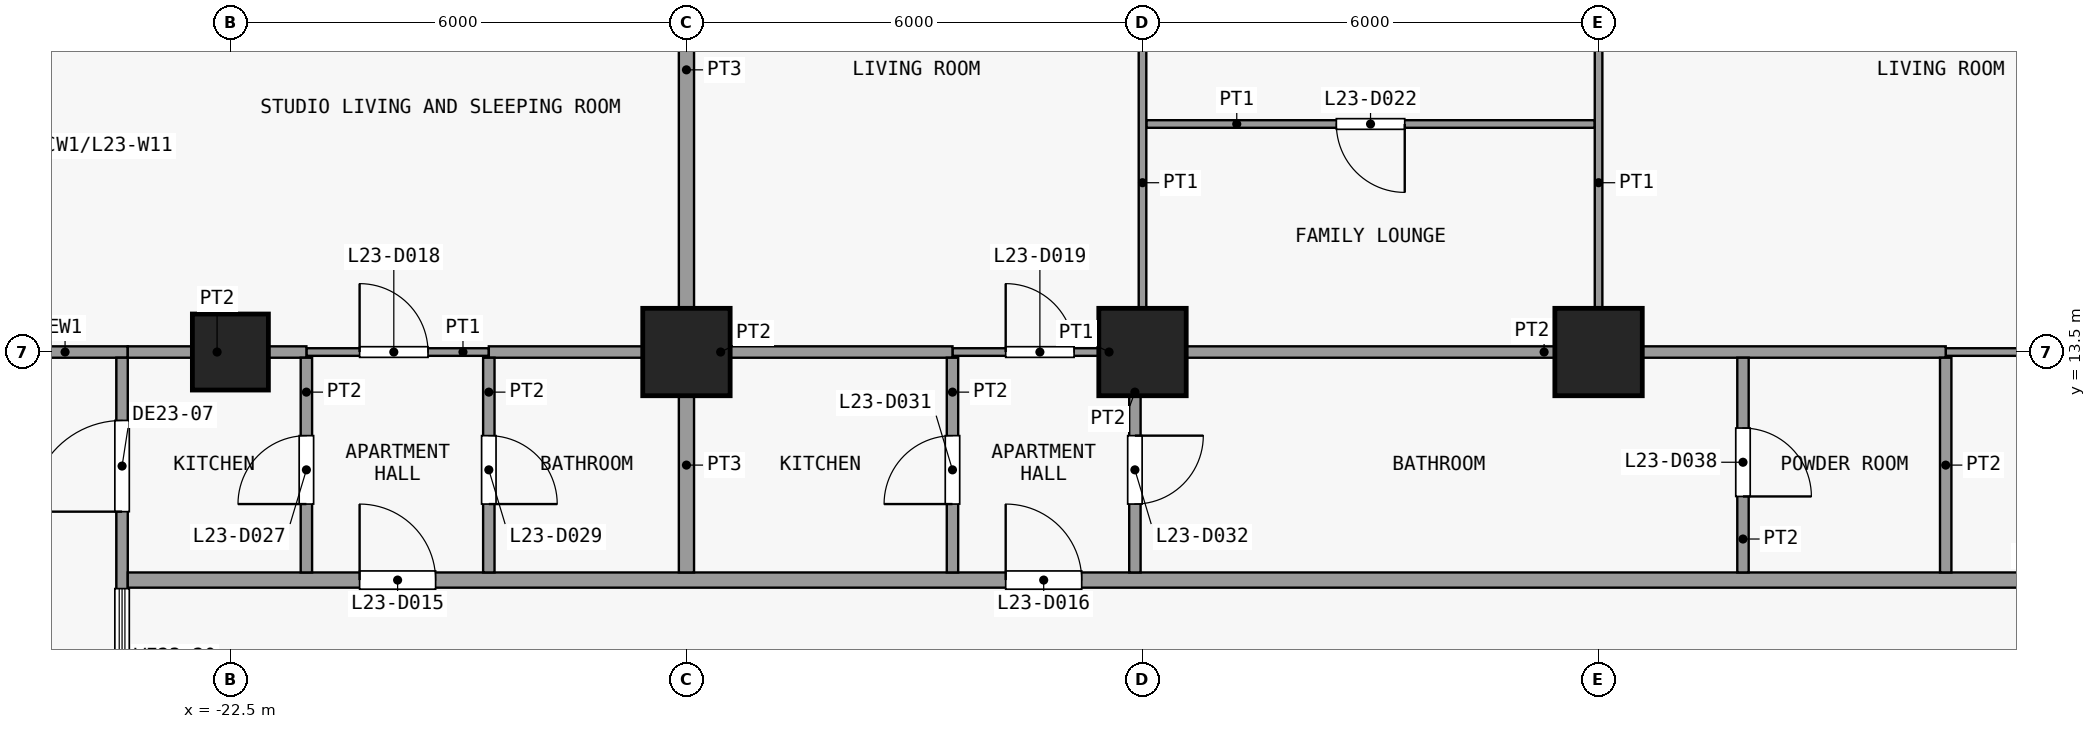
"""IFC4 building model, lengths in metres.
Left out: names, types, materials, properties, quantities, classifications, styles, units other than length and angle.
Written with IfcOpenShell. Run it as: python <this file> out.ifc"""

import sys

from ifc_helpers import new_model, si_unit, direction, frame, frame_2d, origin, origin_2d, place, context, subcontext, project, spatial, rectangle, extrude, element, fill, save


model = new_model("IFC4")
c1 = context("Model", 3, precision=1e-05, world=origin(), true_north=direction((0.0, 1.0)))
c2 = subcontext(c1, "Body", "Model", "MODEL_VIEW")
j1 = project(units=[si_unit("LENGTHUNIT", "METRE"), si_unit("PLANEANGLEUNIT", "RADIAN")], contexts=[c1])
p1 = place(None, origin())
s1 = spatial("IfcSite", under=j1, at=p1, CompositionType="ELEMENT")
p2 = place(p1, origin())
s2 = spatial("IfcBuilding", under=s1, at=p2, CompositionType="ELEMENT")
p3 = place(p2, frame((0.0, 0.0, 95.5)))
s3 = spatial("IfcBuildingStorey", under=s2, at=p3, CompositionType="ELEMENT", Elevation=95.5)
p4 = place(p3, frame((-22.5, 13.5, 0.0), z_axis=(0.0, 0.0, 1.0), x_axis=(1.0, 0.0, 0.0)))
e1 = element("IfcColumn", 1, at=p4, inside=s3, PredefinedType="COLUMN", context=c2, shape_type="SweptSolid", body=[
    extrude(rectangle(XDim=1.0, YDim=1.0, at=origin_2d()), origin(), (0.0, 0.0, 1.0), 3.6),
])
for number, where, z_axis, x_axis in (
    (2, (-16.5, 13.5, 0.0), (0.0, 0.0, 1.0), (1.0, 0.0, 0.0)),
    (3, (-10.5, 13.5, 0.0), (0.0, 0.0, 1.0), (1.0, 0.0, 0.0)),
    (4, (-4.5, 13.5, 0.0), (0.0, 0.0, 1.0), (1.0, 0.0, 0.0)),
):
    element("IfcColumn", number, at=place(p3, frame(where, z_axis=z_axis, x_axis=x_axis)), inside=s3, PredefinedType="COLUMN", context=c2, shape_type="SweptSolid", body=[
        extrude(rectangle(XDim=1.15, YDim=1.15, at=origin_2d()), origin(), (0.0, 0.0, 1.0), 3.6),
    ])
p5 = place(p3, frame((-23.85, 13.5, 0.0), z_axis=(0.0, 0.0, 1.0), x_axis=(-1.0, 0.0, 0.0)))
e5 = element("IfcWall", 5, at=p5, inside=s3, PredefinedType="SOLIDWALL", context=c2, shape_type="SweptSolid", body=[
    extrude(rectangle(XDim=1.65, YDim=0.15, at=frame_2d((0.825, 0.0))), origin(), (0.0, 0.0, 1.0), 3.3),
])
p6 = place(p3, frame((-23.925, 7.575, 0.0), z_axis=(0.0, 0.0, 1.0), x_axis=(0.0, 1.0, 0.0)))
e6 = element("IfcWall", 6, at=p6, inside=s3, PredefinedType="SOLIDWALL", context=c2, shape_type="SweptSolid", body=[
    extrude(rectangle(XDim=5.85, YDim=0.15, at=frame_2d((2.925, 0.0))), origin(), (0.0, 0.0, 1.0), 3.3),
])
p7 = place(p6, frame((3.825, 0.0, 0.0)))
e7 = element("IfcOpeningElement", 7, at=p7, cuts=e6, PredefinedType="OPENING", context=c2, shape_type="SweptSolid", body=[
    extrude(rectangle(XDim=1.2, YDim=2.4, at=frame_2d((0.6, 1.2))), frame((0.0, 0.085, 0.0), z_axis=(0.0, -1.0, 0.0), x_axis=(1.0, 0.0, 0.0)), (0.0, 0.0, 1.0), 0.17),
])
p8 = place(p6, frame((1.012, 0.0, 0.9)))
e8 = element("IfcOpeningElement", 8, at=p8, cuts=e6, PredefinedType="OPENING", context=c2, shape_type="SweptSolid", body=[
    extrude(rectangle(XDim=1.8, YDim=2.1, at=frame_2d((0.9, 1.05))), frame((0.0, 0.085, 0.0), z_axis=(0.0, -1.0, 0.0), x_axis=(1.0, 0.0, 0.0)), (0.0, 0.0, 1.0), 0.17),
])
p9 = place(p3, frame((-23.85, 10.5, 0.0), z_axis=(0.0, 0.0, 1.0), x_axis=(1.0, 0.0, 0.0)))
e9 = element("IfcWall", 9, at=p9, inside=s3, PredefinedType="PARTITIONING", context=c2, shape_type="SweptSolid", body=[
    extrude(rectangle(XDim=47.7, YDim=0.2, at=frame_2d((23.85, 0.0))), origin(), (0.0, 0.0, 1.0), 3.3),
])
p10 = place(p9, frame((3.05, 0.0, 0.0)))
e10 = element("IfcOpeningElement", 10, at=p10, cuts=e9, PredefinedType="OPENING", context=c2, shape_type="SweptSolid", body=[
    extrude(rectangle(XDim=1.0, YDim=2.1, at=frame_2d((0.5, 1.05))), frame((0.0, 0.11, 0.0), z_axis=(0.0, -1.0, 0.0), x_axis=(1.0, 0.0, 0.0)), (0.0, 0.0, 1.0), 0.22),
])
p11 = place(p9, frame((11.55, 0.0, 0.0)))
e11 = element("IfcOpeningElement", 11, at=p11, cuts=e9, PredefinedType="OPENING", context=c2, shape_type="SweptSolid", body=[
    extrude(rectangle(XDim=1.0, YDim=2.1, at=frame_2d((0.5, 1.05))), frame((0.0, 0.11, 0.0), z_axis=(0.0, -1.0, 0.0), x_axis=(1.0, 0.0, 0.0)), (0.0, 0.0, 1.0), 0.22),
])
p12 = place(p9, frame((37.55, 0.0, 0.0)))
e12 = element("IfcOpeningElement", 12, at=p12, cuts=e9, PredefinedType="OPENING", context=c2, shape_type="SweptSolid", body=[
    extrude(rectangle(XDim=1.0, YDim=2.1, at=frame_2d((0.5, 1.05))), frame((0.0, 0.11, 0.0), z_axis=(0.0, -1.0, 0.0), x_axis=(1.0, 0.0, 0.0)), (0.0, 0.0, 1.0), 0.22),
])
p13 = place(p3, frame((-21.5, 13.5, 0.0), z_axis=(0.0, 0.0, 1.0), x_axis=(1.0, 0.0, 0.0)))
e13 = element("IfcWall", 13, at=p13, inside=s3, PredefinedType="PARTITIONING", context=c2, shape_type="SweptSolid", body=[
    extrude(rectangle(XDim=2.4, YDim=0.1, at=frame_2d((1.2, 0.0))), origin(), (0.0, 0.0, 1.0), 3.3),
])
p14 = place(p13, frame((0.7, 0.0, 0.0)))
e14 = element("IfcOpeningElement", 14, at=p14, cuts=e13, PredefinedType="OPENING", context=c2, shape_type="SweptSolid", body=[
    extrude(rectangle(XDim=0.9, YDim=2.1, at=frame_2d((0.45, 1.05))), frame((0.0, 0.06, 0.0), z_axis=(0.0, -1.0, 0.0), x_axis=(1.0, 0.0, 0.0)), (0.0, 0.0, 1.0), 0.12),
])
p15 = place(p3, frame((-13.0, 13.5, 0.0), z_axis=(0.0, 0.0, 1.0), x_axis=(1.0, 0.0, 0.0)))
e15 = element("IfcWall", 15, at=p15, inside=s3, PredefinedType="PARTITIONING", context=c2, shape_type="SweptSolid", body=[
    extrude(rectangle(XDim=2.4, YDim=0.1, at=frame_2d((1.2, 0.0))), origin(), (0.0, 0.0, 1.0), 3.3),
])
p16 = place(p15, frame((0.7, 0.0, 0.0)))
e16 = element("IfcOpeningElement", 16, at=p16, cuts=e15, PredefinedType="OPENING", context=c2, shape_type="SweptSolid", body=[
    extrude(rectangle(XDim=0.9, YDim=2.1, at=frame_2d((0.45, 1.05))), frame((0.0, 0.06, 0.0), z_axis=(0.0, -1.0, 0.0), x_axis=(1.0, 0.0, 0.0)), (0.0, 0.0, 1.0), 0.12),
])
p17 = place(p3, frame((0.067, 13.5, 0.0), z_axis=(0.0, 0.0, 1.0), x_axis=(1.0, 0.0, 0.0)))
e17 = element("IfcWall", 17, at=p17, inside=s3, PredefinedType="PARTITIONING", context=c2, shape_type="SweptSolid", body=[
    extrude(rectangle(XDim=7.733, YDim=0.1, at=frame_2d((3.867, 0.0))), origin(), (0.0, 0.0, 1.0), 3.3),
])
p18 = place(p17, frame((1.8, 0.0, 0.0)))
e18 = element("IfcOpeningElement", 18, at=p18, cuts=e17, PredefinedType="OPENING", context=c2, shape_type="SweptSolid", body=[
    extrude(rectangle(XDim=0.9, YDim=2.1, at=frame_2d((0.45, 1.05))), frame((0.0, 0.06, 0.0), z_axis=(0.0, -1.0, 0.0), x_axis=(1.0, 0.0, 0.0)), (0.0, 0.0, 1.0), 0.12),
])
p19 = place(p3, frame((-23.85, 13.5, 0.0), z_axis=(0.0, 0.0, 1.0), x_axis=(1.0, 0.0, 0.0)))
e19 = element("IfcWall", 19, at=p19, inside=s3, PredefinedType="PARTITIONING", context=c2, shape_type="SweptSolid", body=[
    extrude(rectangle(XDim=2.35, YDim=0.15, at=frame_2d((1.175, 0.0))), origin(), (0.0, 0.0, 1.0), 3.3),
])
p20 = place(p3, frame((-19.1, 13.5, 0.0), z_axis=(0.0, 0.0, 1.0), x_axis=(1.0, 0.0, 0.0)))
e20 = element("IfcWall", 20, at=p20, inside=s3, PredefinedType="PARTITIONING", context=c2, shape_type="SweptSolid", body=[
    extrude(rectangle(XDim=6.1, YDim=0.15, at=frame_2d((3.05, 0.0))), origin(), (0.0, 0.0, 1.0), 3.3),
])
p21 = place(p3, frame((-10.5, 13.5, 0.0), z_axis=(0.0, 0.0, 1.0), x_axis=(1.0, 0.0, 0.0)))
e21 = element("IfcWall", 21, at=p21, inside=s3, PredefinedType="PARTITIONING", context=c2, shape_type="SweptSolid", body=[
    extrude(rectangle(XDim=10.567, YDim=0.15, at=frame_2d((5.283, 0.0))), origin(), (0.0, 0.0, 1.0), 3.3),
])
p22 = place(p3, frame((-10.45, 16.5, 0.0), z_axis=(0.0, 0.0, 1.0), x_axis=(1.0, 0.0, 0.0)))
e22 = element("IfcWall", 22, at=p22, inside=s3, PredefinedType="PARTITIONING", context=c2, shape_type="SweptSolid", body=[
    extrude(rectangle(XDim=5.9, YDim=0.1, at=frame_2d((2.95, 0.0))), origin(), (0.0, 0.0, 1.0), 3.3),
])
p23 = place(p22, frame((2.5, 0.0, 0.0)))
e23 = element("IfcOpeningElement", 23, at=p23, cuts=e22, PredefinedType="OPENING", context=c2, shape_type="SweptSolid", body=[
    extrude(rectangle(XDim=0.9, YDim=2.1, at=frame_2d((0.45, 1.05))), frame((0.0, 0.06, 0.0), z_axis=(0.0, -1.0, 0.0), x_axis=(1.0, 0.0, 0.0)), (0.0, 0.0, 1.0), 0.12),
])
p24 = place(p3, frame((-21.5, 10.6, 0.0), z_axis=(0.0, 0.0, 1.0), x_axis=(0.0, 1.0, 0.0)))
e24 = element("IfcWall", 24, at=p24, inside=s3, PredefinedType="PARTITIONING", context=c2, shape_type="SweptSolid", body=[
    extrude(rectangle(XDim=2.825, YDim=0.15, at=frame_2d((1.413, 0.0))), origin(), (0.0, 0.0, 1.0), 3.3),
])
p25 = place(p24, frame((0.9, 0.0, 0.0)))
e25 = element("IfcOpeningElement", 25, at=p25, cuts=e24, PredefinedType="OPENING", context=c2, shape_type="SweptSolid", body=[
    extrude(rectangle(XDim=0.9, YDim=2.1, at=frame_2d((0.45, 1.05))), frame((0.0, 0.085, 0.0), z_axis=(0.0, -1.0, 0.0), x_axis=(1.0, 0.0, 0.0)), (0.0, 0.0, 1.0), 0.17),
])
p26 = place(p3, frame((-19.1, 10.6, 0.0), z_axis=(0.0, 0.0, 1.0), x_axis=(0.0, 1.0, 0.0)))
e26 = element("IfcWall", 26, at=p26, inside=s3, PredefinedType="PARTITIONING", context=c2, shape_type="SweptSolid", body=[
    extrude(rectangle(XDim=2.825, YDim=0.15, at=frame_2d((1.413, 0.0))), origin(), (0.0, 0.0, 1.0), 3.3),
])
p27 = place(p26, frame((0.9, 0.0, 0.0)))
e27 = element("IfcOpeningElement", 27, at=p27, cuts=e26, PredefinedType="OPENING", context=c2, shape_type="SweptSolid", body=[
    extrude(rectangle(XDim=0.9, YDim=2.1, at=frame_2d((0.45, 1.05))), frame((0.0, 0.085, 0.0), z_axis=(0.0, -1.0, 0.0), x_axis=(1.0, 0.0, 0.0)), (0.0, 0.0, 1.0), 0.17),
])
p28 = place(p3, frame((-16.5, 10.6, 0.0), z_axis=(0.0, 0.0, 1.0), x_axis=(0.0, 1.0, 0.0)))
e28 = element("IfcWall", 28, at=p28, inside=s3, PredefinedType="PARTITIONING", context=c2, shape_type="SweptSolid", body=[
    extrude(rectangle(XDim=2.825, YDim=0.2, at=frame_2d((1.413, 0.0))), origin(), (0.0, 0.0, 1.0), 3.3),
])
p29 = place(p3, frame((-16.5, 13.575, 0.0), z_axis=(0.0, 0.0, 1.0), x_axis=(0.0, 1.0, 0.0)))
e29 = element("IfcWall", 29, at=p29, inside=s3, PredefinedType="PARTITIONING", context=c2, shape_type="SweptSolid", body=[
    extrude(rectangle(XDim=7.275, YDim=0.2, at=frame_2d((3.638, 0.0))), origin(), (0.0, 0.0, 1.0), 3.3),
])
p30 = place(p3, frame((-13.0, 10.6, 0.0), z_axis=(0.0, 0.0, 1.0), x_axis=(0.0, 1.0, 0.0)))
e30 = element("IfcWall", 30, at=p30, inside=s3, PredefinedType="PARTITIONING", context=c2, shape_type="SweptSolid", body=[
    extrude(rectangle(XDim=2.825, YDim=0.15, at=frame_2d((1.413, 0.0))), origin(), (0.0, 0.0, 1.0), 3.3),
])
p31 = place(p30, frame((0.9, 0.0, 0.0)))
e31 = element("IfcOpeningElement", 31, at=p31, cuts=e30, PredefinedType="OPENING", context=c2, shape_type="SweptSolid", body=[
    extrude(rectangle(XDim=0.9, YDim=2.1, at=frame_2d((0.45, 1.05))), frame((0.0, 0.085, 0.0), z_axis=(0.0, -1.0, 0.0), x_axis=(1.0, 0.0, 0.0)), (0.0, 0.0, 1.0), 0.17),
])
p32 = place(p3, frame((-10.6, 10.6, 0.0), z_axis=(0.0, 0.0, 1.0), x_axis=(0.0, 1.0, 0.0)))
e32 = element("IfcWall", 32, at=p32, inside=s3, PredefinedType="PARTITIONING", context=c2, shape_type="SweptSolid", body=[
    extrude(rectangle(XDim=2.825, YDim=0.15, at=frame_2d((1.413, 0.0))), origin(), (0.0, 0.0, 1.0), 3.3),
])
p33 = place(p32, frame((0.9, 0.0, 0.0)))
e33 = element("IfcOpeningElement", 33, at=p33, cuts=e32, PredefinedType="OPENING", context=c2, shape_type="SweptSolid", body=[
    extrude(rectangle(XDim=0.9, YDim=2.1, at=frame_2d((0.45, 1.05))), frame((0.0, 0.085, 0.0), z_axis=(0.0, -1.0, 0.0), x_axis=(1.0, 0.0, 0.0)), (0.0, 0.0, 1.0), 0.17),
])
p34 = place(p3, frame((-10.5, 13.575, 0.0), z_axis=(0.0, 0.0, 1.0), x_axis=(0.0, 1.0, 0.0)))
e34 = element("IfcWall", 34, at=p34, inside=s3, PredefinedType="PARTITIONING", context=c2, shape_type="SweptSolid", body=[
    extrude(rectangle(XDim=7.275, YDim=0.1, at=frame_2d((3.638, 0.0))), origin(), (0.0, 0.0, 1.0), 3.3),
])
p35 = place(p34, frame((4.425, 0.0, 0.0)))
e35 = element("IfcOpeningElement", 35, at=p35, cuts=e34, PredefinedType="OPENING", context=c2, shape_type="SweptSolid", body=[
    extrude(rectangle(XDim=0.9, YDim=2.1, at=frame_2d((0.45, 1.05))), frame((0.0, 0.06, 0.0), z_axis=(0.0, -1.0, 0.0), x_axis=(1.0, 0.0, 0.0)), (0.0, 0.0, 1.0), 0.12),
])
p36 = place(p3, frame((-4.5, 13.575, 0.0), z_axis=(0.0, 0.0, 1.0), x_axis=(0.0, 1.0, 0.0)))
e36 = element("IfcWall", 36, at=p36, inside=s3, PredefinedType="PARTITIONING", context=c2, shape_type="SweptSolid", body=[
    extrude(rectangle(XDim=7.275, YDim=0.1, at=frame_2d((3.638, 0.0))), origin(), (0.0, 0.0, 1.0), 3.3),
])
p37 = place(p36, frame((4.425, 0.0, 0.0)))
e37 = element("IfcOpeningElement", 37, at=p37, cuts=e36, PredefinedType="OPENING", context=c2, shape_type="SweptSolid", body=[
    extrude(rectangle(XDim=0.9, YDim=2.1, at=frame_2d((0.45, 1.05))), frame((0.0, 0.06, 0.0), z_axis=(0.0, -1.0, 0.0), x_axis=(1.0, 0.0, 0.0)), (0.0, 0.0, 1.0), 0.12),
])
p38 = place(p3, frame((-2.6, 10.6, 0.0), z_axis=(0.0, 0.0, 1.0), x_axis=(0.0, 1.0, 0.0)))
e38 = element("IfcWall", 38, at=p38, inside=s3, PredefinedType="PARTITIONING", context=c2, shape_type="SweptSolid", body=[
    extrude(rectangle(XDim=2.825, YDim=0.15, at=frame_2d((1.413, 0.0))), origin(), (0.0, 0.0, 1.0), 3.3),
])
p39 = place(p38, frame((1.0, 0.0, 0.0)))
e39 = element("IfcOpeningElement", 39, at=p39, cuts=e38, PredefinedType="OPENING", context=c2, shape_type="SweptSolid", body=[
    extrude(rectangle(XDim=0.9, YDim=2.1, at=frame_2d((0.45, 1.05))), frame((0.0, 0.085, 0.0), z_axis=(0.0, -1.0, 0.0), x_axis=(1.0, 0.0, 0.0)), (0.0, 0.0, 1.0), 0.17),
])
p40 = place(p3, frame((0.067, 10.6, 0.0), z_axis=(0.0, 0.0, 1.0), x_axis=(0.0, 1.0, 0.0)))
e40 = element("IfcWall", 40, at=p40, inside=s3, PredefinedType="PARTITIONING", context=c2, shape_type="SweptSolid", body=[
    extrude(rectangle(XDim=2.825, YDim=0.15, at=frame_2d((1.413, 0.0))), origin(), (0.0, 0.0, 1.0), 3.3),
])
p41 = place(p7, origin())
e41 = element("IfcDoor", 41, at=p41, inside=s3, OperationType="SINGLE_SWING_LEFT", PredefinedType="DOOR", context=c2, shape_type="SweptSolid", body=[
    extrude(rectangle(XDim=1.2, YDim=2.4, at=frame_2d((0.6, 1.2))), frame((0.0, 0.025, 0.0), z_axis=(0.0, -1.0, 0.0), x_axis=(1.0, 0.0, 0.0)), (0.0, 0.0, 1.0), 0.05),
])
fill(e7, e41)
p42 = place(p8, origin())
e42 = element("IfcWindow", 42, at=p42, inside=s3, PartitioningType="SINGLE_PANEL", PredefinedType="WINDOW", context=c2, shape_type="SweptSolid", body=[
    extrude(rectangle(XDim=1.8, YDim=2.1, at=frame_2d((0.9, 1.05))), frame((0.0, 0.03, 0.0), z_axis=(0.0, -1.0, 0.0), x_axis=(1.0, 0.0, 0.0)), (0.0, 0.0, 1.0), 0.06),
])
fill(e8, e42)
p43 = place(p10, origin())
e43 = element("IfcDoor", 43, at=p43, inside=s3, OperationType="SINGLE_SWING_RIGHT", PredefinedType="DOOR", context=c2, shape_type="SweptSolid", body=[
    extrude(rectangle(XDim=1.0, YDim=2.1, at=frame_2d((0.5, 1.05))), frame((0.0, 0.025, 0.0), z_axis=(0.0, -1.0, 0.0), x_axis=(1.0, 0.0, 0.0)), (0.0, 0.0, 1.0), 0.05),
])
fill(e10, e43)
p44 = place(p11, origin())
e44 = element("IfcDoor", 44, at=p44, inside=s3, OperationType="SINGLE_SWING_RIGHT", PredefinedType="DOOR", context=c2, shape_type="SweptSolid", body=[
    extrude(rectangle(XDim=1.0, YDim=2.1, at=frame_2d((0.5, 1.05))), frame((0.0, 0.025, 0.0), z_axis=(0.0, -1.0, 0.0), x_axis=(1.0, 0.0, 0.0)), (0.0, 0.0, 1.0), 0.05),
])
fill(e11, e44)
p45 = place(p14, origin())
e45 = element("IfcDoor", 45, at=p45, inside=s3, OperationType="SINGLE_SWING_RIGHT", PredefinedType="DOOR", context=c2, shape_type="SweptSolid", body=[
    extrude(rectangle(XDim=0.9, YDim=2.1, at=frame_2d((0.45, 1.05))), frame((0.0, 0.025, 0.0), z_axis=(0.0, -1.0, 0.0), x_axis=(1.0, 0.0, 0.0)), (0.0, 0.0, 1.0), 0.05),
])
fill(e14, e45)
p46 = place(p16, origin())
e46 = element("IfcDoor", 46, at=p46, inside=s3, OperationType="SINGLE_SWING_RIGHT", PredefinedType="DOOR", context=c2, shape_type="SweptSolid", body=[
    extrude(rectangle(XDim=0.9, YDim=2.1, at=frame_2d((0.45, 1.05))), frame((0.0, 0.025, 0.0), z_axis=(0.0, -1.0, 0.0), x_axis=(1.0, 0.0, 0.0)), (0.0, 0.0, 1.0), 0.05),
])
fill(e16, e46)
p47 = place(p23, origin())
e47 = element("IfcDoor", 47, at=p47, inside=s3, OperationType="SINGLE_SWING_RIGHT", PredefinedType="DOOR", context=c2, shape_type="SweptSolid", body=[
    extrude(rectangle(XDim=0.9, YDim=2.1, at=frame_2d((0.45, 1.05))), frame((0.0, 0.025, 0.0), z_axis=(0.0, -1.0, 0.0), x_axis=(1.0, 0.0, 0.0)), (0.0, 0.0, 1.0), 0.05),
])
fill(e23, e47)
p48 = place(p25, origin())
e48 = element("IfcDoor", 48, at=p48, inside=s3, OperationType="SINGLE_SWING_RIGHT", PredefinedType="DOOR", context=c2, shape_type="SweptSolid", body=[
    extrude(rectangle(XDim=0.9, YDim=2.1, at=frame_2d((0.45, 1.05))), frame((0.0, 0.025, 0.0), z_axis=(0.0, -1.0, 0.0), x_axis=(1.0, 0.0, 0.0)), (0.0, 0.0, 1.0), 0.05),
])
fill(e25, e48)
p49 = place(p27, origin())
e49 = element("IfcDoor", 49, at=p49, inside=s3, OperationType="SINGLE_SWING_LEFT", PredefinedType="DOOR", context=c2, shape_type="SweptSolid", body=[
    extrude(rectangle(XDim=0.9, YDim=2.1, at=frame_2d((0.45, 1.05))), frame((0.0, 0.025, 0.0), z_axis=(0.0, -1.0, 0.0), x_axis=(1.0, 0.0, 0.0)), (0.0, 0.0, 1.0), 0.05),
])
fill(e27, e49)
p50 = place(p31, origin())
e50 = element("IfcDoor", 50, at=p50, inside=s3, OperationType="SINGLE_SWING_RIGHT", PredefinedType="DOOR", context=c2, shape_type="SweptSolid", body=[
    extrude(rectangle(XDim=0.9, YDim=2.1, at=frame_2d((0.45, 1.05))), frame((0.0, 0.025, 0.0), z_axis=(0.0, -1.0, 0.0), x_axis=(1.0, 0.0, 0.0)), (0.0, 0.0, 1.0), 0.05),
])
fill(e31, e50)
p51 = place(p33, origin())
e51 = element("IfcDoor", 51, at=p51, inside=s3, OperationType="SINGLE_SWING_RIGHT", PredefinedType="DOOR", context=c2, shape_type="SweptSolid", body=[
    extrude(rectangle(XDim=0.9, YDim=2.1, at=frame_2d((0.45, 1.05))), frame((0.0, 0.025, 0.0), z_axis=(0.0, -1.0, 0.0), x_axis=(1.0, 0.0, 0.0)), (0.0, 0.0, 1.0), 0.05),
])
fill(e33, e51)
p52 = place(p39, origin())
e52 = element("IfcDoor", 52, at=p52, inside=s3, OperationType="SINGLE_SWING_LEFT", PredefinedType="DOOR", context=c2, shape_type="SweptSolid", body=[
    extrude(rectangle(XDim=0.9, YDim=2.1, at=frame_2d((0.45, 1.05))), frame((0.0, 0.025, 0.0), z_axis=(0.0, -1.0, 0.0), x_axis=(1.0, 0.0, 0.0)), (0.0, 0.0, 1.0), 0.05),
])
fill(e39, e52)
save(model, sys.argv[1])
